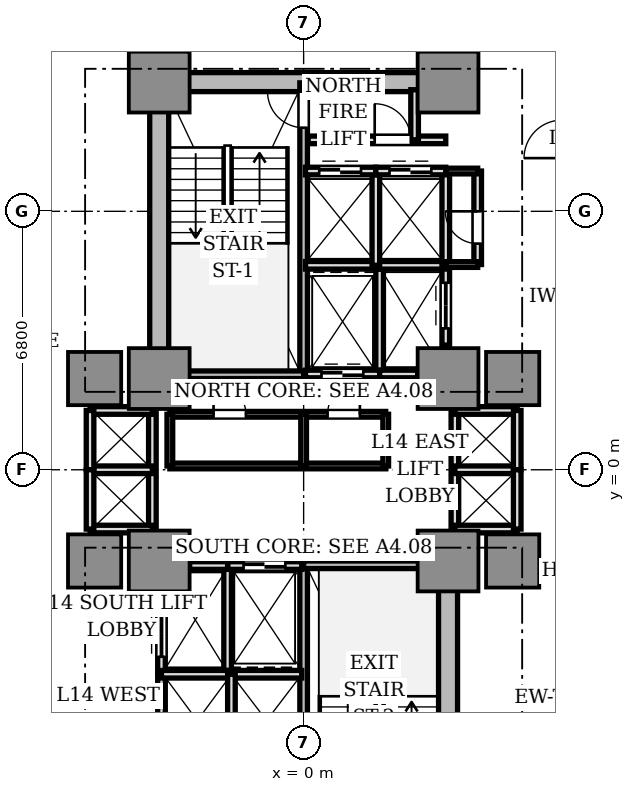
"""IFC4 building model, lengths in metres.
Left out: names, types, materials, properties, quantities, classifications, styles, units other than length and angle.
Written with IfcOpenShell. Run it as: python <this file> out.ifc"""

import sys

from ifc_helpers import new_model, si_unit, direction, frame, frame_2d, origin, origin_2d, place, context, subcontext, project, spatial, rectangle, extrude, source, transform, mapped, element, fill, save


model = new_model("IFC4")
c1 = context("Model", 3, precision=1e-05, world=origin(), true_north=direction((0.0, 1.0)))
c2 = subcontext(c1, "Body", "Model", "MODEL_VIEW")
j1 = project(units=[si_unit("LENGTHUNIT", "METRE"), si_unit("PLANEANGLEUNIT", "RADIAN")], contexts=[c1])
p1 = place(None, origin())
s1 = spatial("IfcSite", under=j1, at=p1, CompositionType="ELEMENT")
p2 = place(p1, origin())
s2 = spatial("IfcBuilding", under=s1, at=p2, CompositionType="ELEMENT")
p3 = place(p2, frame((0.0, 0.0, 54.4)))
s3 = spatial("IfcBuildingStorey", under=s2, at=p3, CompositionType="ELEMENT", Elevation=54.4)
p4 = place(p3, frame((-3.55, 10.2, 0.0), z_axis=(0.0, 0.0, 1.0), x_axis=(1.0, 0.0, 0.0)))
e1 = element("IfcWall", 1, at=p4, inside=s3, PredefinedType="SHEAR", context=c2, shape_type="SweptSolid", body=[
    extrude(rectangle(XDim=7.1, YDim=0.5, at=frame_2d((3.55, 0.0))), origin(), (0.0, 0.0, 1.0), 3.11),
])
for number, where, z_axis, x_axis in (
    (2, (-3.8, 2.85, 0.0), (0.0, 0.0, 1.0), (0.0, 1.0, 0.0)),
    (3, (3.8, -9.75, 0.0), (0.0, 0.0, 1.0), (0.0, 1.0, 0.0)),
):
    element("IfcWall", number, at=place(p3, frame(where, z_axis=z_axis, x_axis=x_axis)), inside=s3, PredefinedType="SHEAR", context=c2, shape_type="SweptSolid", body=[
        extrude(rectangle(XDim=6.9, YDim=0.5, at=frame_2d((3.45, 0.0))), origin(), (0.0, 0.0, 1.0), 3.11),
    ])
m1 = source(origin(), c2, "Body", "SweptSolid", [
    extrude(rectangle(XDim=1.6, YDim=1.6, at=origin_2d()), origin(), (0.0, 0.0, 1.0), 3.11),
])
for number, where, z_axis, x_axis in (
    (4, (-3.8, 2.4, 0.0), (0.0, 0.0, 1.0), (1.0, 0.0, 0.0)),
    (5, (3.8, 2.4, 0.0), (0.0, 0.0, 1.0), (1.0, 0.0, 0.0)),
    (6, (-3.8, 10.2, 0.0), (0.0, 0.0, 1.0), (1.0, 0.0, 0.0)),
    (7, (3.8, 10.2, 0.0), (0.0, 0.0, 1.0), (1.0, 0.0, 0.0)),
    (8, (-3.8, -2.4, 0.0), (0.0, 0.0, 1.0), (1.0, 0.0, 0.0)),
    (9, (3.8, -2.4, 0.0), (0.0, 0.0, 1.0), (1.0, 0.0, 0.0)),
):
    element("IfcColumn", number, at=place(p3, frame(where, z_axis=z_axis, x_axis=x_axis)), inside=s3, PredefinedType="COLUMN", context=c2, shape_type="MappedRepresentation", body=[
        mapped(m1, transform((0.0, 0.0, 0.0), scale=1.0)),
    ])
m2 = source(origin(), c2, "Body", "SweptSolid", [
    extrude(rectangle(XDim=1.4, YDim=1.4, at=origin_2d()), origin(), (0.0, 0.0, 1.0), 3.11),
])
for number, where, z_axis, x_axis in (
    (10, (5.5, 2.4, 0.0), (0.0, 0.0, 1.0), (1.0, 0.0, 0.0)),
    (11, (-5.5, 2.4, 0.0), (0.0, 0.0, 1.0), (1.0, 0.0, 0.0)),
    (12, (5.5, -2.4, 0.0), (0.0, 0.0, 1.0), (1.0, 0.0, 0.0)),
    (13, (-5.5, -2.4, 0.0), (0.0, 0.0, 1.0), (1.0, 0.0, 0.0)),
):
    element("IfcColumn", number, at=place(p3, frame(where, z_axis=z_axis, x_axis=x_axis)), inside=s3, PredefinedType="COLUMN", context=c2, shape_type="MappedRepresentation", body=[
        mapped(m2, transform((0.0, 0.0, 0.0), scale=1.0)),
    ])
p5 = place(p3, frame((0.0, 2.5, 0.0), z_axis=(0.0, 0.0, 1.0), x_axis=(0.0, 1.0, 0.0)))
e14 = element("IfcWall", 14, at=p5, inside=s3, PredefinedType="SOLIDWALL", context=c2, shape_type="SweptSolid", body=[
    extrude(rectangle(XDim=7.68, YDim=0.2, at=frame_2d((3.84, 0.0))), origin(), (0.0, 0.0, 1.0), 3.11),
])
p6 = place(p5, frame((6.5, 0.0, 0.0)))
e15 = element("IfcOpeningElement", 15, at=p6, cuts=e14, PredefinedType="OPENING", context=c2, shape_type="SweptSolid", body=[
    extrude(rectangle(XDim=0.95, YDim=2.15, at=frame_2d((0.475, 1.075))), frame((0.0, 0.11, 0.0), z_axis=(0.0, -1.0, 0.0), x_axis=(1.0, 0.0, 0.0)), (0.0, 0.0, 1.0), 0.22),
])
p7 = place(p3, frame((-3.72, 2.5, 0.0), z_axis=(0.0, 0.0, 1.0), x_axis=(1.0, 0.0, 0.0)))
e16 = element("IfcWall", 16, at=p7, inside=s3, PredefinedType="SOLIDWALL", context=c2, shape_type="SweptSolid", body=[
    extrude(rectangle(XDim=3.72, YDim=0.2, at=frame_2d((1.86, 0.0))), origin(), (0.0, 0.0, 1.0), 3.11),
])
p8 = place(p3, frame((0.0, -10.18, 0.0), z_axis=(0.0, 0.0, 1.0), x_axis=(0.0, 1.0, 0.0)))
e17 = element("IfcWall", 17, at=p8, inside=s3, PredefinedType="SOLIDWALL", context=c2, shape_type="SweptSolid", body=[
    extrude(rectangle(XDim=7.68, YDim=0.2, at=frame_2d((3.84, 0.0))), origin(), (0.0, 0.0, 1.0), 3.11),
])
p9 = place(p8, frame((0.28, 0.0, 0.0)))
e18 = element("IfcOpeningElement", 18, at=p9, cuts=e17, PredefinedType="OPENING", context=c2, shape_type="SweptSolid", body=[
    extrude(rectangle(XDim=1.1, YDim=2.15, at=frame_2d((0.55, 1.075))), frame((0.0, 0.11, 0.0), z_axis=(0.0, -1.0, 0.0), x_axis=(1.0, 0.0, 0.0)), (0.0, 0.0, 1.0), 0.22),
])
p10 = place(p3, frame((0.0, -2.5, 0.0), z_axis=(0.0, 0.0, 1.0), x_axis=(1.0, 0.0, 0.0)))
e19 = element("IfcWall", 19, at=p10, inside=s3, PredefinedType="SOLIDWALL", context=c2, shape_type="SweptSolid", body=[
    extrude(rectangle(XDim=3.72, YDim=0.2, at=frame_2d((1.86, 0.0))), origin(), (0.0, 0.0, 1.0), 3.11),
])
p11 = place(p3, frame((2.0, 2.5, 0.0), z_axis=(0.0, 0.0, 1.0), x_axis=(0.0, 1.0, 0.0)))
e20 = element("IfcWall", 20, at=p11, inside=s3, PredefinedType="SOLIDWALL", context=c2, shape_type="SweptSolid", body=[
    extrude(rectangle(XDim=2.78, YDim=0.2, at=frame_2d((1.39, 0.0))), origin(), (0.0, 0.0, 1.0), 2.66),
])
p12 = place(p3, frame((0.05, 2.52, 0.0), z_axis=(0.0, 0.0, 1.0), x_axis=(1.0, 0.0, 0.0)))
e21 = element("IfcWall", 21, at=p12, inside=s3, PredefinedType="SOLIDWALL", context=c2, shape_type="SweptSolid", body=[
    extrude(rectangle(XDim=1.95, YDim=0.2, at=frame_2d((0.975, 0.0))), origin(), (0.0, 0.0, 1.0), 2.66),
])
p13 = place(p12, frame((0.42, 0.0, 0.0)))
e22 = element("IfcOpeningElement", 22, at=p13, cuts=e21, PredefinedType="OPENING", context=c2, shape_type="SweptSolid", body=[
    extrude(rectangle(XDim=1.1, YDim=2.2, at=frame_2d((0.55, 1.1))), frame((0.0, 0.11, 0.0), z_axis=(0.0, -1.0, 0.0), x_axis=(1.0, 0.0, 0.0)), (0.0, 0.0, 1.0), 0.22),
])
p14 = place(p3, frame((-2.0, -5.28, 0.0), z_axis=(0.0, 0.0, 1.0), x_axis=(0.0, 1.0, 0.0)))
e23 = element("IfcWall", 23, at=p14, inside=s3, PredefinedType="SOLIDWALL", context=c2, shape_type="SweptSolid", body=[
    extrude(rectangle(XDim=2.78, YDim=0.2, at=frame_2d((1.39, 0.0))), origin(), (0.0, 0.0, 1.0), 2.66),
])
p15 = place(p3, frame((-2.0, -2.52, 0.0), z_axis=(0.0, 0.0, 1.0), x_axis=(1.0, 0.0, 0.0)))
e24 = element("IfcWall", 24, at=p15, inside=s3, PredefinedType="SOLIDWALL", context=c2, shape_type="SweptSolid", body=[
    extrude(rectangle(XDim=1.95, YDim=0.2, at=frame_2d((0.975, 0.0))), origin(), (0.0, 0.0, 1.0), 2.66),
])
p16 = place(p15, frame((0.42, 0.0, 0.0)))
e25 = element("IfcOpeningElement", 25, at=p16, cuts=e24, PredefinedType="OPENING", context=c2, shape_type="SweptSolid", body=[
    extrude(rectangle(XDim=1.1, YDim=2.2, at=frame_2d((0.55, 1.1))), frame((0.0, 0.11, 0.0), z_axis=(0.0, -1.0, 0.0), x_axis=(1.0, 0.0, 0.0)), (0.0, 0.0, 1.0), 0.22),
])
p17 = place(p3, frame((2.0, 2.52, 0.0), z_axis=(0.0, 0.0, 1.0), x_axis=(1.0, 0.0, 0.0)))
e26 = element("IfcWall", 26, at=p17, inside=s3, PredefinedType="SOLIDWALL", context=c2, shape_type="SweptSolid", body=[
    extrude(rectangle(XDim=1.0, YDim=0.2, at=frame_2d((0.5, 0.0))), origin(), (0.0, 0.0, 1.0), 2.66),
])
p18 = place(p3, frame((3.74, 3.28, 0.0), z_axis=(0.0, 0.0, 1.0), x_axis=(0.0, 1.0, 0.0)))
e27 = element("IfcWall", 27, at=p18, inside=s3, PredefinedType="SOLIDWALL", context=c2, shape_type="SweptSolid", body=[
    extrude(rectangle(XDim=2.08, YDim=0.2, at=frame_2d((1.04, 0.0))), origin(), (0.0, 0.0, 1.0), 2.66),
])
p19 = place(p18, frame((0.44, 0.0, 0.0)))
e28 = element("IfcOpeningElement", 28, at=p19, cuts=e27, PredefinedType="OPENING", context=c2, shape_type="SweptSolid", body=[
    extrude(rectangle(XDim=1.2, YDim=2.2, at=frame_2d((0.6, 1.1))), frame((0.0, 0.11, 0.0), z_axis=(0.0, -1.0, 0.0), x_axis=(1.0, 0.0, 0.0)), (0.0, 0.0, 1.0), 0.22),
])
p20 = place(p3, frame((-3.0, -2.52, 0.0), z_axis=(0.0, 0.0, 1.0), x_axis=(1.0, 0.0, 0.0)))
e29 = element("IfcWall", 29, at=p20, inside=s3, PredefinedType="SOLIDWALL", context=c2, shape_type="SweptSolid", body=[
    extrude(rectangle(XDim=1.0, YDim=0.2, at=frame_2d((0.5, 0.0))), origin(), (0.0, 0.0, 1.0), 2.66),
])
p21 = place(p3, frame((-3.74, -5.36, 0.0), z_axis=(0.0, 0.0, 1.0), x_axis=(0.0, 1.0, 0.0)))
e30 = element("IfcWall", 30, at=p21, inside=s3, PredefinedType="SOLIDWALL", context=c2, shape_type="SweptSolid", body=[
    extrude(rectangle(XDim=2.08, YDim=0.2, at=frame_2d((1.04, 0.0))), origin(), (0.0, 0.0, 1.0), 2.66),
])
p22 = place(p21, frame((0.44, 0.0, 0.0)))
e31 = element("IfcOpeningElement", 31, at=p22, cuts=e30, PredefinedType="OPENING", context=c2, shape_type="SweptSolid", body=[
    extrude(rectangle(XDim=1.2, YDim=2.2, at=frame_2d((0.6, 1.1))), frame((0.0, 0.11, 0.0), z_axis=(0.0, -1.0, 0.0), x_axis=(1.0, 0.0, 0.0)), (0.0, 0.0, 1.0), 0.22),
])
p23 = place(p3, frame((0.05, 5.38, 0.0), z_axis=(0.0, 0.0, 1.0), x_axis=(1.0, 0.0, 0.0)))
e32 = element("IfcWall", 32, at=p23, inside=s3, PredefinedType="SOLIDWALL", context=c2, shape_type="SweptSolid", body=[
    extrude(rectangle(XDim=3.69, YDim=0.2, at=frame_2d((1.845, 0.0))), origin(), (0.0, 0.0, 1.0), 2.66),
])
p24 = place(p3, frame((1.9, 5.38, 0.0), z_axis=(0.0, 0.0, 1.0), x_axis=(0.0, 1.0, 0.0)))
e33 = element("IfcWall", 33, at=p24, inside=s3, PredefinedType="SOLIDWALL", context=c2, shape_type="SweptSolid", body=[
    extrude(rectangle(XDim=2.48, YDim=0.2, at=frame_2d((1.24, 0.0))), origin(), (0.0, 0.0, 1.0), 2.66),
])
p25 = place(p3, frame((0.05, 7.86, 0.0), z_axis=(0.0, 0.0, 1.0), x_axis=(1.0, 0.0, 0.0)))
e34 = element("IfcWall", 34, at=p25, inside=s3, PredefinedType="SOLIDWALL", context=c2, shape_type="SweptSolid", body=[
    extrude(rectangle(XDim=1.85, YDim=0.2, at=frame_2d((0.925, 0.0))), origin(), (0.0, 0.0, 1.0), 2.66),
])
p26 = place(p25, frame((0.36, 0.0, 0.0)))
e35 = element("IfcOpeningElement", 35, at=p26, cuts=e34, PredefinedType="OPENING", context=c2, shape_type="SweptSolid", body=[
    extrude(rectangle(XDim=1.1, YDim=2.2, at=frame_2d((0.55, 1.1))), frame((0.0, 0.11, 0.0), z_axis=(0.0, -1.0, 0.0), x_axis=(1.0, 0.0, 0.0)), (0.0, 0.0, 1.0), 0.22),
])
p27 = place(p3, frame((3.74, 5.38, 0.0), z_axis=(0.0, 0.0, 1.0), x_axis=(0.0, 1.0, 0.0)))
e36 = element("IfcWall", 36, at=p27, inside=s3, PredefinedType="SOLIDWALL", context=c2, shape_type="SweptSolid", body=[
    extrude(rectangle(XDim=2.48, YDim=0.2, at=frame_2d((1.24, 0.0))), origin(), (0.0, 0.0, 1.0), 2.66),
])
p28 = place(p3, frame((1.9, 7.86, 0.0), z_axis=(0.0, 0.0, 1.0), x_axis=(1.0, 0.0, 0.0)))
e37 = element("IfcWall", 37, at=p28, inside=s3, PredefinedType="SOLIDWALL", context=c2, shape_type="SweptSolid", body=[
    extrude(rectangle(XDim=1.84, YDim=0.2, at=frame_2d((0.92, 0.0))), origin(), (0.0, 0.0, 1.0), 2.66),
])
p29 = place(p28, frame((0.36, 0.0, 0.0)))
e38 = element("IfcOpeningElement", 38, at=p29, cuts=e37, PredefinedType="OPENING", context=c2, shape_type="SweptSolid", body=[
    extrude(rectangle(XDim=1.1, YDim=2.2, at=frame_2d((0.55, 1.1))), frame((0.0, 0.11, 0.0), z_axis=(0.0, -1.0, 0.0), x_axis=(1.0, 0.0, 0.0)), (0.0, 0.0, 1.0), 0.22),
])
p30 = place(p3, frame((-3.74, -7.86, 0.0), z_axis=(0.0, 0.0, 1.0), x_axis=(0.0, 1.0, 0.0)))
e39 = element("IfcWall", 39, at=p30, inside=s3, PredefinedType="SOLIDWALL", context=c2, shape_type="SweptSolid", body=[
    extrude(rectangle(XDim=2.48, YDim=0.2, at=frame_2d((1.24, 0.0))), origin(), (0.0, 0.0, 1.0), 2.66),
])
p31 = place(p3, frame((-3.74, -5.38, 0.0), z_axis=(0.0, 0.0, 1.0), x_axis=(1.0, 0.0, 0.0)))
e40 = element("IfcWall", 40, at=p31, inside=s3, PredefinedType="SOLIDWALL", context=c2, shape_type="SweptSolid", body=[
    extrude(rectangle(XDim=3.69, YDim=0.2, at=frame_2d((1.845, 0.0))), origin(), (0.0, 0.0, 1.0), 2.66),
])
p32 = place(p3, frame((-1.9, -7.86, 0.0), z_axis=(0.0, 0.0, 1.0), x_axis=(0.0, 1.0, 0.0)))
e41 = element("IfcWall", 41, at=p32, inside=s3, PredefinedType="SOLIDWALL", context=c2, shape_type="SweptSolid", body=[
    extrude(rectangle(XDim=2.48, YDim=0.2, at=frame_2d((1.24, 0.0))), origin(), (0.0, 0.0, 1.0), 2.66),
])
p33 = place(p3, frame((3.98, -1.56, 0.0), z_axis=(0.0, 0.0, 1.0), x_axis=(0.0, 1.0, 0.0)))
e42 = element("IfcWall", 42, at=p33, inside=s3, PredefinedType="SOLIDWALL", context=c2, shape_type="SweptSolid", body=[
    extrude(rectangle(XDim=3.12, YDim=0.2, at=frame_2d((1.56, 0.0))), origin(), (0.0, 0.0, 1.0), 2.18),
])
for number, where, z_axis, x_axis in (
    (43, (3.98, 1.56, 0.0), (0.0, 0.0, 1.0), (1.0, 0.0, 0.0)),
    (44, (3.98, -1.56, 0.0), (0.0, 0.0, 1.0), (1.0, 0.0, 0.0)),
    (45, (3.98, 0.0, 0.0), (0.0, 0.0, 1.0), (1.0, 0.0, 0.0)),
):
    element("IfcWall", number, at=place(p3, frame(where, z_axis=z_axis, x_axis=x_axis)), inside=s3, PredefinedType="SOLIDWALL", context=c2, shape_type="SweptSolid", body=[
        extrude(rectangle(XDim=1.64, YDim=0.2, at=frame_2d((0.82, 0.0))), origin(), (0.0, 0.0, 1.0), 2.66),
    ])
for number, where, z_axis, x_axis in (
    (46, (5.62, 0.0, 0.0), (0.0, 0.0, 1.0), (0.0, 1.0, 0.0)),
    (47, (5.62, -1.56, 0.0), (0.0, 0.0, 1.0), (0.0, 1.0, 0.0)),
):
    element("IfcWall", number, at=place(p3, frame(where, z_axis=z_axis, x_axis=x_axis)), inside=s3, PredefinedType="SOLIDWALL", context=c2, shape_type="SweptSolid", body=[
        extrude(rectangle(XDim=1.56, YDim=0.2, at=frame_2d((0.78, 0.0))), origin(), (0.0, 0.0, 1.0), 2.66),
    ])
p34 = place(p3, frame((-3.98, -1.56, 0.0), z_axis=(0.0, 0.0, 1.0), x_axis=(0.0, 1.0, 0.0)))
e48 = element("IfcWall", 48, at=p34, inside=s3, PredefinedType="SOLIDWALL", context=c2, shape_type="SweptSolid", body=[
    extrude(rectangle(XDim=3.12, YDim=0.2, at=frame_2d((1.56, 0.0))), origin(), (0.0, 0.0, 1.0), 2.18),
])
for number, where, z_axis, x_axis in (
    (49, (-5.62, 1.56, 0.0), (0.0, 0.0, 1.0), (1.0, 0.0, 0.0)),
    (50, (-5.62, -1.56, 0.0), (0.0, 0.0, 1.0), (1.0, 0.0, 0.0)),
    (51, (-5.62, 0.0, 0.0), (0.0, 0.0, 1.0), (1.0, 0.0, 0.0)),
):
    element("IfcWall", number, at=place(p3, frame(where, z_axis=z_axis, x_axis=x_axis)), inside=s3, PredefinedType="SOLIDWALL", context=c2, shape_type="SweptSolid", body=[
        extrude(rectangle(XDim=1.64, YDim=0.2, at=frame_2d((0.82, 0.0))), origin(), (0.0, 0.0, 1.0), 2.66),
    ])
for number, where, z_axis, x_axis in (
    (52, (-5.62, 0.0, 0.0), (0.0, 0.0, 1.0), (0.0, 1.0, 0.0)),
    (53, (-5.62, -1.56, 0.0), (0.0, 0.0, 1.0), (0.0, 1.0, 0.0)),
):
    element("IfcWall", number, at=place(p3, frame(where, z_axis=z_axis, x_axis=x_axis)), inside=s3, PredefinedType="SOLIDWALL", context=c2, shape_type="SweptSolid", body=[
        extrude(rectangle(XDim=1.56, YDim=0.2, at=frame_2d((0.78, 0.0))), origin(), (0.0, 0.0, 1.0), 2.66),
    ])
p35 = place(p3, frame((0.12, 8.68, 0.0), z_axis=(0.0, 0.0, 1.0), x_axis=(1.0, 0.0, 0.0)))
e54 = element("IfcWall", 54, at=p35, inside=s3, PredefinedType="SOLIDWALL", context=c2, shape_type="SweptSolid", body=[
    extrude(rectangle(XDim=3.62, YDim=0.2, at=frame_2d((1.81, 0.0))), origin(), (0.0, 0.0, 1.0), 2.66),
])
p36 = place(p35, frame((1.75, 0.0, 0.0)))
e55 = element("IfcOpeningElement", 55, at=p36, cuts=e54, PredefinedType="OPENING", context=c2, shape_type="SweptSolid", body=[
    extrude(rectangle(XDim=0.95, YDim=2.15, at=frame_2d((0.475, 1.075))), frame((0.0, 0.11, 0.0), z_axis=(0.0, -1.0, 0.0), x_axis=(1.0, 0.0, 0.0)), (0.0, 0.0, 1.0), 0.22),
])
p37 = place(p3, frame((2.92, 8.68, 0.0), z_axis=(0.0, 0.0, 1.0), x_axis=(0.0, 1.0, 0.0)))
e56 = element("IfcWall", 56, at=p37, inside=s3, PredefinedType="SOLIDWALL", context=c2, shape_type="SweptSolid", body=[
    extrude(rectangle(XDim=1.32, YDim=0.2, at=frame_2d((0.66, 0.0))), origin(), (0.0, 0.0, 1.0), 2.66),
])
p38 = place(p3, frame((4.58, 5.4, 0.0), z_axis=(0.0, 0.0, 1.0), x_axis=(0.0, 1.0, 0.0)))
e57 = element("IfcWall", 57, at=p38, inside=s3, PredefinedType="SOLIDWALL", context=c2, shape_type="SweptSolid", body=[
    extrude(rectangle(XDim=2.46, YDim=0.2, at=frame_2d((1.23, 0.0))), origin(), (0.0, 0.0, 1.0), 2.66),
])
p39 = place(p38, frame((0.55, 0.0, 0.0)))
e58 = element("IfcOpeningElement", 58, at=p39, cuts=e57, PredefinedType="OPENING", context=c2, shape_type="SweptSolid", body=[
    extrude(rectangle(XDim=0.85, YDim=2.1, at=frame_2d((0.425, 1.05))), frame((0.0, 0.11, 0.0), z_axis=(0.0, -1.0, 0.0), x_axis=(1.0, 0.0, 0.0)), (0.0, 0.0, 1.0), 0.22),
])
for number, where, z_axis, x_axis in (
    (59, (3.74, 5.4, 0.0), (0.0, 0.0, 1.0), (1.0, 0.0, 0.0)),
    (60, (3.74, 7.86, 0.0), (0.0, 0.0, 1.0), (1.0, 0.0, 0.0)),
):
    element("IfcWall", number, at=place(p3, frame(where, z_axis=z_axis, x_axis=x_axis)), inside=s3, PredefinedType="PARTITIONING", context=c2, shape_type="SweptSolid", body=[
        extrude(rectangle(XDim=0.84, YDim=0.15, at=frame_2d((0.42, 0.0))), origin(), (0.0, 0.0, 1.0), 2.66),
    ])
p40 = place(p3, frame((-3.52, 0.1, 0.0), z_axis=(0.0, 0.0, 1.0), x_axis=(1.0, 0.0, 0.0)))
e61 = element("IfcWall", 61, at=p40, inside=s3, PredefinedType="PARTITIONING", context=c2, shape_type="SweptSolid", body=[
    extrude(rectangle(XDim=5.68, YDim=0.15, at=frame_2d((2.84, 0.0))), origin(), (0.0, 0.0, 1.0), 2.66),
])
p41 = place(p3, frame((-3.52, 1.46, 0.0), z_axis=(0.0, 0.0, 1.0), x_axis=(1.0, 0.0, 0.0)))
e62 = element("IfcWall", 62, at=p41, inside=s3, PredefinedType="PARTITIONING", context=c2, shape_type="SweptSolid", body=[
    extrude(rectangle(XDim=5.68, YDim=0.15, at=frame_2d((2.84, 0.0))), origin(), (0.0, 0.0, 1.0), 2.66),
])
p42 = place(p41, frame((1.15, 0.0, 0.0)))
e63 = element("IfcOpeningElement", 63, at=p42, cuts=e62, PredefinedType="OPENING", context=c2, shape_type="SweptSolid", body=[
    extrude(rectangle(XDim=0.85, YDim=2.1, at=frame_2d((0.425, 1.05))), frame((0.0, 0.085, 0.0), z_axis=(0.0, -1.0, 0.0), x_axis=(1.0, 0.0, 0.0)), (0.0, 0.0, 1.0), 0.17),
])
p43 = place(p41, frame((4.15, 0.0, 0.0)))
e64 = element("IfcOpeningElement", 64, at=p43, cuts=e62, PredefinedType="OPENING", context=c2, shape_type="SweptSolid", body=[
    extrude(rectangle(XDim=0.85, YDim=2.1, at=frame_2d((0.425, 1.05))), frame((0.0, 0.085, 0.0), z_axis=(0.0, -1.0, 0.0), x_axis=(1.0, 0.0, 0.0)), (0.0, 0.0, 1.0), 0.17),
])
p44 = place(p3, frame((-3.52, 0.1, 0.0), z_axis=(0.0, 0.0, 1.0), x_axis=(0.0, 1.0, 0.0)))
e65 = element("IfcWall", 65, at=p44, inside=s3, PredefinedType="PARTITIONING", context=c2, shape_type="SweptSolid", body=[
    extrude(rectangle(XDim=1.36, YDim=0.15, at=frame_2d((0.68, 0.0))), origin(), (0.0, 0.0, 1.0), 2.18),
])
for number, where, z_axis, x_axis in (
    (66, (2.16, 0.1, 0.0), (0.0, 0.0, 1.0), (0.0, 1.0, 0.0)),
    (67, (0.0, 0.1, 0.0), (0.0, 0.0, 1.0), (0.0, 1.0, 0.0)),
):
    element("IfcWall", number, at=place(p3, frame(where, z_axis=z_axis, x_axis=x_axis)), inside=s3, PredefinedType="PARTITIONING", context=c2, shape_type="SweptSolid", body=[
        extrude(rectangle(XDim=1.36, YDim=0.15, at=frame_2d((0.68, 0.0))), origin(), (0.0, 0.0, 1.0), 2.66),
    ])
m3 = source(origin(), c2, "Body", "SweptSolid", [
    extrude(rectangle(XDim=1.1, YDim=0.05, at=origin_2d()), origin(), (0.0, 0.0, 1.0), 2.2),
])
p45 = place(p13, frame((0.55, 0.0, 0.0)))
e68 = element("IfcDoor", 68, at=p45, inside=s3, OperationType="DOUBLE_DOOR_SLIDING", PredefinedType="DOOR", context=c2, shape_type="MappedRepresentation", body=[
    mapped(m3, transform((0.0, 0.0, 0.0), scale=1.0)),
])
fill(e22, e68)
p46 = place(p16, frame((0.55, 0.0, 0.0)))
e69 = element("IfcDoor", 69, at=p46, inside=s3, OperationType="DOUBLE_DOOR_SLIDING", PredefinedType="DOOR", context=c2, shape_type="MappedRepresentation", body=[
    mapped(m3, transform((0.0, 0.0, 0.0), scale=1.0)),
])
fill(e25, e69)
m4 = source(origin(), c2, "Body", "SweptSolid", [
    extrude(rectangle(XDim=1.2, YDim=0.05, at=origin_2d()), origin(), (0.0, 0.0, 1.0), 2.2),
])
p47 = place(p19, frame((0.6, 0.0, 0.0)))
e70 = element("IfcDoor", 70, at=p47, inside=s3, OperationType="DOUBLE_DOOR_SLIDING", PredefinedType="DOOR", context=c2, shape_type="MappedRepresentation", body=[
    mapped(m4, transform((0.0, 0.0, 0.0), scale=1.0)),
])
fill(e28, e70)
p48 = place(p22, frame((0.6, 0.0, 0.0)))
e71 = element("IfcDoor", 71, at=p48, inside=s3, OperationType="DOUBLE_DOOR_SLIDING", PredefinedType="DOOR", context=c2, shape_type="MappedRepresentation", body=[
    mapped(m4, transform((0.0, 0.0, 0.0), scale=1.0)),
])
fill(e31, e71)
p49 = place(p26, frame((0.55, 0.0, 0.0)))
e72 = element("IfcDoor", 72, at=p49, inside=s3, OperationType="DOUBLE_DOOR_SLIDING", PredefinedType="DOOR", context=c2, shape_type="MappedRepresentation", body=[
    mapped(m3, transform((0.0, 0.0, 0.0), scale=1.0)),
])
fill(e35, e72)
p50 = place(p29, frame((0.55, 0.0, 0.0)))
e73 = element("IfcDoor", 73, at=p50, inside=s3, OperationType="DOUBLE_DOOR_SLIDING", PredefinedType="DOOR", context=c2, shape_type="MappedRepresentation", body=[
    mapped(m3, transform((0.0, 0.0, 0.0), scale=1.0)),
])
fill(e38, e73)
m5 = source(origin(), c2, "Body", "SweptSolid", [
    extrude(rectangle(XDim=0.95, YDim=0.05, at=origin_2d()), origin(), (0.0, 0.0, 1.0), 2.15),
])
p51 = place(p6, frame((0.475, 0.0, 0.0)))
e74 = element("IfcDoor", 74, at=p51, inside=s3, OperationType="SINGLE_SWING_RIGHT", PredefinedType="DOOR", context=c2, shape_type="MappedRepresentation", body=[
    mapped(m5, transform((0.0, 0.0, 0.0), scale=1.0)),
])
fill(e15, e74)
p52 = place(p36, frame((0.475, 0.0, 0.0)))
e75 = element("IfcDoor", 75, at=p52, inside=s3, OperationType="SINGLE_SWING_LEFT", PredefinedType="DOOR", context=c2, shape_type="MappedRepresentation", body=[
    mapped(m5, transform((0.0, 0.0, 0.0), scale=1.0)),
])
fill(e55, e75)
m6 = source(origin(), c2, "Body", "SweptSolid", [
    extrude(rectangle(XDim=0.85, YDim=0.05, at=origin_2d()), origin(), (0.0, 0.0, 1.0), 2.1),
])
p53 = place(p39, frame((0.425, 0.0, 0.0)))
e76 = element("IfcDoor", 76, at=p53, inside=s3, OperationType="SINGLE_SWING_RIGHT", PredefinedType="DOOR", context=c2, shape_type="MappedRepresentation", body=[
    mapped(m6, transform((0.0, 0.0, 0.0), scale=1.0)),
])
fill(e58, e76)
p54 = place(p42, frame((0.425, 0.0, 0.0)))
e77 = element("IfcDoor", 77, at=p54, inside=s3, OperationType="SINGLE_SWING_LEFT", PredefinedType="DOOR", context=c2, shape_type="MappedRepresentation", body=[
    mapped(m6, transform((0.0, 0.0, 0.0), scale=1.0)),
])
fill(e63, e77)
p55 = place(p43, frame((0.425, 0.0, 0.0)))
e78 = element("IfcDoor", 78, at=p55, inside=s3, OperationType="SINGLE_SWING_RIGHT", PredefinedType="DOOR", context=c2, shape_type="MappedRepresentation", body=[
    mapped(m6, transform((0.0, 0.0, 0.0), scale=1.0)),
])
fill(e64, e78)
save(model, sys.argv[1])
